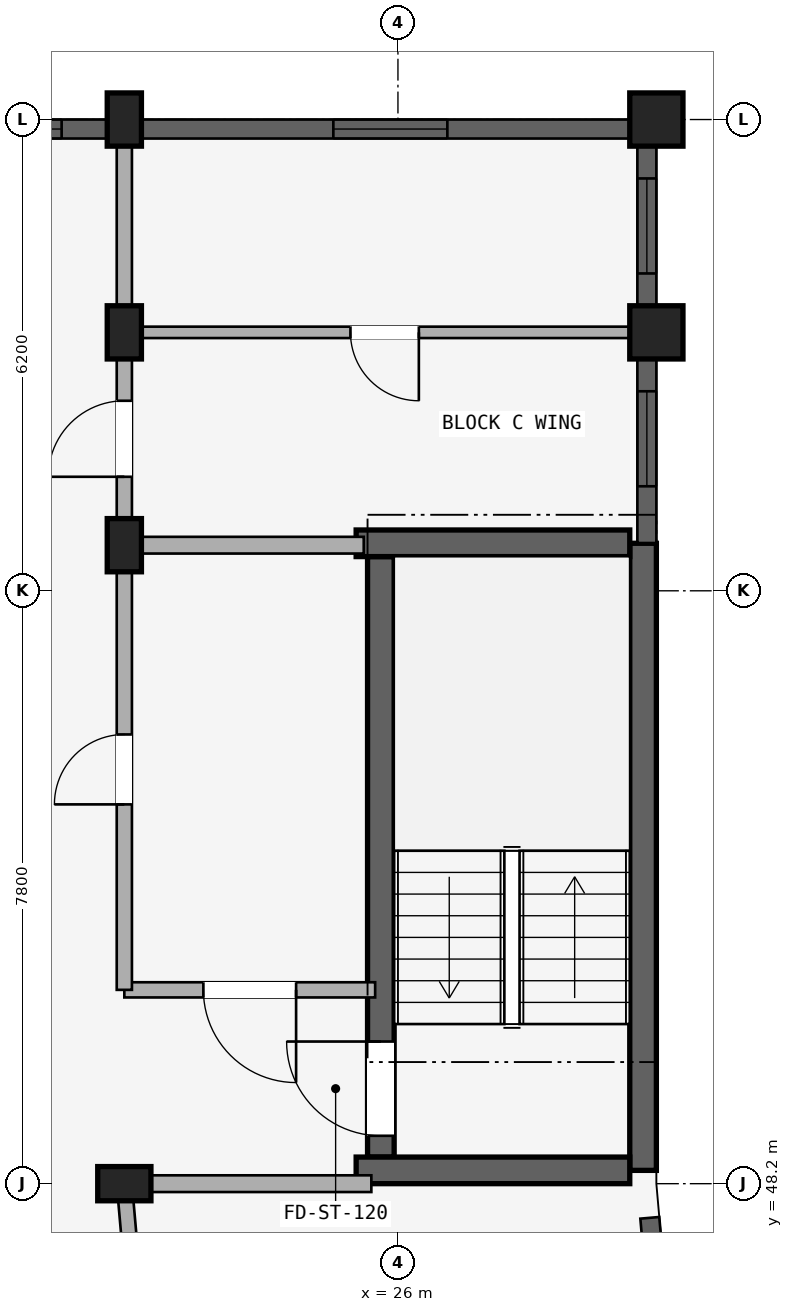
"""IFC4 building model, lengths in metres.
Left out: names, types, materials, properties, quantities, classifications, styles, units other than length and angle.
Written with IfcOpenShell. Run it as: python <this file> out.ifc"""

import sys

from ifc_helpers import new_model, si_unit, direction, frame, frame_2d, origin, origin_2d, place, context, subcontext, project, spatial, rectangle, extrude, element, fill, save


model = new_model("IFC4")
c1 = context("Model", 3, precision=1e-05, world=origin(), true_north=direction((0.0, 1.0)))
c2 = subcontext(c1, "Body", "Model", "MODEL_VIEW")
j1 = project(units=[si_unit("LENGTHUNIT", "METRE"), si_unit("PLANEANGLEUNIT", "RADIAN")], contexts=[c1])
p1 = place(None, origin())
s1 = spatial("IfcSite", under=j1, at=p1, CompositionType="ELEMENT")
p2 = place(p1, origin())
s2 = spatial("IfcBuilding", under=s1, at=p2, CompositionType="ELEMENT")
p3 = place(p2, frame((0.0, 0.0, 24.45)))
s3 = spatial("IfcBuildingStorey", under=s2, at=p3, CompositionType="ELEMENT", Elevation=24.45)
p4 = place(p3, frame((29.225, 48.375, 0.0), z_axis=(0.0, 0.0, 1.0), x_axis=(0.0, 1.0, 0.0)))
e1 = element("IfcWall", 1, at=p4, inside=s3, PredefinedType="SHEAR", context=c2, shape_type="SweptSolid", body=[
    extrude(rectangle(XDim=8.25, YDim=0.35, at=frame_2d((4.125, 0.0))), origin(), (0.0, 0.0, 1.0), 2.93),
])
p5 = place(p3, frame((25.775, 48.55, 0.0), z_axis=(0.0, 0.0, 1.0), x_axis=(0.0, 1.0, 0.0)))
e2 = element("IfcWall", 2, at=p5, inside=s3, PredefinedType="SHEAR", context=c2, shape_type="SweptSolid", body=[
    extrude(rectangle(XDim=7.9, YDim=0.35, at=frame_2d((3.95, 0.0))), origin(), (0.0, 0.0, 1.0), 2.93),
])
p6 = place(p5, frame((0.28, 0.0, 0.0)))
e3 = element("IfcOpeningElement", 3, at=p6, cuts=e2, PredefinedType="OPENING", context=c2, shape_type="SweptSolid", body=[
    extrude(rectangle(XDim=1.24, YDim=2.15, at=frame_2d((0.62, 1.075))), frame((0.0, 0.185, 0.0), z_axis=(0.0, -1.0, 0.0), x_axis=(1.0, 0.0, 0.0)), (0.0, 0.0, 1.0), 0.37),
])
for number, where, z_axis, x_axis in (
    (4, (29.05, 48.375, 0.0), (0.0, 0.0, 1.0), (-1.0, 0.0, 0.0)),
    (5, (29.05, 56.625, 0.0), (0.0, 0.0, 1.0), (-1.0, 0.0, 0.0)),
):
    element("IfcWall", number, at=place(p3, frame(where, z_axis=z_axis, x_axis=x_axis)), inside=s3, PredefinedType="SHEAR", context=c2, shape_type="SweptSolid", body=[
        extrude(rectangle(XDim=3.6, YDim=0.35, at=frame_2d((1.8, 0.0))), origin(), (0.0, 0.0, 1.0), 2.93),
    ])
for number, where, z_axis, x_axis in (
    (6, (22.4, 48.2, 0.0), (0.0, 0.0, 1.0), (0.0, 1.0, 0.0)),
    (7, (22.4, 56.6, 0.0), (0.0, 0.0, 1.0), (1.0, 0.0, 0.0)),
):
    element("IfcColumn", number, at=place(p3, frame(where, z_axis=z_axis, x_axis=x_axis)), inside=s3, PredefinedType="COLUMN", context=c2, shape_type="SweptSolid", body=[
        extrude(rectangle(XDim=0.45, YDim=0.7, at=origin_2d()), origin(), (0.0, 0.0, 1.0), 2.93),
    ])
p7 = place(p3, frame((29.4, 59.4, 0.0), z_axis=(0.0, 0.0, 1.0), x_axis=(1.0, 0.0, 0.0)))
e8 = element("IfcColumn", 8, at=p7, inside=s3, PredefinedType="COLUMN", context=c2, shape_type="SweptSolid", body=[
    extrude(rectangle(XDim=0.7, YDim=0.7, at=origin_2d()), origin(), (0.0, 0.0, 1.0), 2.93),
])
p8 = place(p3, frame((22.4, 59.4, 0.0), z_axis=(0.0, 0.0, 1.0), x_axis=(1.0, 0.0, 0.0)))
e9 = element("IfcColumn", 9, at=p8, inside=s3, PredefinedType="COLUMN", context=c2, shape_type="SweptSolid", body=[
    extrude(rectangle(XDim=0.45, YDim=0.7, at=origin_2d()), origin(), (0.0, 0.0, 1.0), 2.93),
])
p9 = place(p3, frame((29.4, 62.2, 0.0), z_axis=(0.0, 0.0, 1.0), x_axis=(1.0, 0.0, 0.0)))
e10 = element("IfcColumn", 10, at=p9, inside=s3, PredefinedType="COLUMN", context=c2, shape_type="SweptSolid", body=[
    extrude(rectangle(XDim=0.7, YDim=0.7, at=origin_2d()), origin(), (0.0, 0.0, 1.0), 2.93),
])
p10 = place(p3, frame((22.4, 62.2, 0.0), z_axis=(0.0, 0.0, 1.0), x_axis=(1.0, 0.0, 0.0)))
e11 = element("IfcColumn", 11, at=p10, inside=s3, PredefinedType="COLUMN", context=c2, shape_type="SweptSolid", body=[
    extrude(rectangle(XDim=0.45, YDim=0.7, at=origin_2d()), origin(), (0.0, 0.0, 1.0), 2.93),
])
p11 = place(p3, frame((25.7, 50.75, 0.0), z_axis=(0.0, 0.0, 1.0), x_axis=(-1.0, 0.0, 0.0)))
e12 = element("IfcWall", 12, at=p11, inside=s3, PredefinedType="STANDARD", context=c2, shape_type="SweptSolid", body=[
    extrude(rectangle(XDim=3.3, YDim=0.2, at=frame_2d((1.65, 0.0))), origin(), (0.0, 0.0, 1.0), 2.372),
])
p12 = place(p11, frame((1.04, 0.0, 0.0)))
e13 = element("IfcOpeningElement", 13, at=p12, cuts=e12, PredefinedType="OPENING", context=c2, shape_type="SweptSolid", body=[
    extrude(rectangle(XDim=1.22, YDim=2.15, at=frame_2d((0.61, 1.075))), frame((0.0, 0.11, 0.0), z_axis=(0.0, -1.0, 0.0), x_axis=(1.0, 0.0, 0.0)), (0.0, 0.0, 1.0), 0.22),
])
p13 = place(p3, frame((22.4, 50.75, 0.0), z_axis=(0.0, 0.0, 1.0), x_axis=(0.0, 1.0, 0.0)))
e14 = element("IfcWall", 14, at=p13, inside=s3, PredefinedType="STANDARD", context=c2, shape_type="SweptSolid", body=[
    extrude(rectangle(XDim=5.8, YDim=0.2, at=frame_2d((2.9, 0.0))), origin(), (0.0, 0.0, 1.0), 2.372),
])
p14 = place(p13, frame((2.44, 0.0, 0.0)))
e15 = element("IfcOpeningElement", 15, at=p14, cuts=e14, PredefinedType="OPENING", context=c2, shape_type="SweptSolid", body=[
    extrude(rectangle(XDim=0.92, YDim=2.1, at=frame_2d((0.46, 1.05))), frame((0.0, 0.11, 0.0), z_axis=(0.0, -1.0, 0.0), x_axis=(1.0, 0.0, 0.0)), (0.0, 0.0, 1.0), 0.22),
])
p15 = place(p3, frame((22.792, 43.72, 0.0), z_axis=(0.0, 0.0, 1.0), x_axis=(-0.087187153726, 0.996191949488, 0.0)))
e16 = element("IfcWall", 16, at=p15, inside=s3, PredefinedType="STANDARD", context=c2, shape_type="SweptSolid", body=[
    extrude(rectangle(XDim=4.497, YDim=0.2, at=frame_2d((2.249, 0.0))), origin(), (0.0, 0.0, 1.0), 2.372),
])
p16 = place(p3, frame((25.65, 48.2, 0.0), z_axis=(0.0, 0.0, 1.0), x_axis=(-1.0, 0.0, 0.0)))
e17 = element("IfcWall", 17, at=p16, inside=s3, PredefinedType="STANDARD", context=c2, shape_type="SweptSolid", body=[
    extrude(rectangle(XDim=3.2, YDim=0.22, at=frame_2d((1.6, 0.0))), origin(), (0.0, 0.0, 1.0), 2.372),
])
p17 = place(p3, frame((22.4, 56.6, 0.0), z_axis=(0.0, 0.0, 1.0), x_axis=(0.0, 1.0, 0.0)))
e18 = element("IfcWall", 18, at=p17, inside=s3, PredefinedType="STANDARD", context=c2, shape_type="SweptSolid", body=[
    extrude(rectangle(XDim=2.8, YDim=0.2, at=frame_2d((1.4, 0.0))), origin(), (0.0, 0.0, 1.0), 2.372),
])
p18 = place(p17, frame((0.9, 0.0, 0.0)))
e19 = element("IfcOpeningElement", 19, at=p18, cuts=e18, PredefinedType="OPENING", context=c2, shape_type="SweptSolid", body=[
    extrude(rectangle(XDim=1.0, YDim=2.15, at=frame_2d((0.5, 1.075))), frame((0.0, 0.11, 0.0), z_axis=(0.0, -1.0, 0.0), x_axis=(1.0, 0.0, 0.0)), (0.0, 0.0, 1.0), 0.22),
])
p19 = place(p3, frame((25.55, 56.6, 0.0), z_axis=(0.0, 0.0, 1.0), x_axis=(-1.0, 0.0, 0.0)))
e20 = element("IfcWall", 20, at=p19, inside=s3, PredefinedType="STANDARD", context=c2, shape_type="SweptSolid", body=[
    extrude(rectangle(XDim=3.1, YDim=0.22, at=frame_2d((1.55, 0.0))), origin(), (0.0, 0.0, 1.0), 2.372),
])
p20 = place(p3, frame((22.4, 59.4, 0.0), z_axis=(0.0, 0.0, 1.0), x_axis=(0.0, 1.0, 0.0)))
e21 = element("IfcWall", 21, at=p20, inside=s3, PredefinedType="STANDARD", context=c2, shape_type="SweptSolid", body=[
    extrude(rectangle(XDim=2.8, YDim=0.2, at=frame_2d((1.4, 0.0))), origin(), (0.0, 0.0, 1.0), 2.372),
])
p21 = place(p3, frame((29.2, 59.4, 0.0), z_axis=(0.0, 0.0, 1.0), x_axis=(-1.0, 0.0, 0.0)))
e22 = element("IfcWall", 22, at=p21, inside=s3, PredefinedType="PARTITIONING", context=c2, shape_type="SweptSolid", body=[
    extrude(rectangle(XDim=6.75, YDim=0.15, at=frame_2d((3.375, 0.0))), origin(), (0.0, 0.0, 1.0), 2.372),
])
p22 = place(p21, frame((2.925, 0.0, 0.0)))
e23 = element("IfcOpeningElement", 23, at=p22, cuts=e22, PredefinedType="OPENING", context=c2, shape_type="SweptSolid", body=[
    extrude(rectangle(XDim=0.9, YDim=2.1, at=frame_2d((0.45, 1.05))), frame((0.0, 0.085, 0.0), z_axis=(0.0, -1.0, 0.0), x_axis=(1.0, 0.0, 0.0)), (0.0, 0.0, 1.0), 0.17),
])
p23 = place(p3, frame((29.539, 45.177, 0.0), z_axis=(0.0, 0.0, 1.0), x_axis=(-0.087229084652, 0.996188278786, 0.0)))
e24 = element("IfcWall", 24, at=p23, inside=s3, PredefinedType="STANDARD", context=c2, shape_type="SweptSolid", body=[
    extrude(rectangle(XDim=2.583, YDim=0.25, at=frame_2d((1.292, 0.0))), origin(), (0.0, 0.0, 1.0), 2.422),
])
p24 = place(p23, frame((0.61, 0.0, 0.622)))
e25 = element("IfcOpeningElement", 25, at=p24, cuts=e24, PredefinedType="OPENING", context=c2, shape_type="SweptSolid", body=[
    extrude(rectangle(XDim=1.55, YDim=1.6, at=frame_2d((0.775, 0.8))), frame((0.0, 0.135, 0.0), z_axis=(0.0, -1.0, 0.0), x_axis=(1.0, 0.0, 0.0)), (0.0, 0.0, 1.0), 0.27),
])
p25 = place(p3, frame((29.275, 56.628, 0.0), z_axis=(0.0, 0.0, 1.0), x_axis=(0.0, 1.0, 0.0)))
e26 = element("IfcWall", 26, at=p25, inside=s3, PredefinedType="STANDARD", context=c2, shape_type="SweptSolid", body=[
    extrude(rectangle(XDim=2.418, YDim=0.25, at=frame_2d((1.209, 0.0))), origin(), (0.0, 0.0, 1.0), 2.472),
])
p26 = place(p25, frame((0.747, 0.0, 0.722)))
e27 = element("IfcOpeningElement", 27, at=p26, cuts=e26, PredefinedType="OPENING", context=c2, shape_type="SweptSolid", body=[
    extrude(rectangle(XDim=1.25, YDim=1.55, at=frame_2d((0.625, 0.775))), frame((0.0, 0.135, 0.0), z_axis=(0.0, -1.0, 0.0), x_axis=(1.0, 0.0, 0.0)), (0.0, 0.0, 1.0), 0.27),
])
p27 = place(p3, frame((29.275, 59.753, 0.0), z_axis=(0.0, 0.0, 1.0), x_axis=(0.0, 1.0, 0.0)))
e28 = element("IfcWall", 28, at=p27, inside=s3, PredefinedType="STANDARD", context=c2, shape_type="SweptSolid", body=[
    extrude(rectangle(XDim=2.093, YDim=0.25, at=frame_2d((1.046, 0.0))), origin(), (0.0, 0.0, 1.0), 2.472),
])
p28 = place(p27, frame((0.421, 0.0, 0.722)))
e29 = element("IfcOpeningElement", 29, at=p28, cuts=e28, PredefinedType="OPENING", context=c2, shape_type="SweptSolid", body=[
    extrude(rectangle(XDim=1.25, YDim=1.55, at=frame_2d((0.625, 0.775))), frame((0.0, 0.135, 0.0), z_axis=(0.0, -1.0, 0.0), x_axis=(1.0, 0.0, 0.0)), (0.0, 0.0, 1.0), 0.27),
])
p29 = place(p3, frame((29.046, 62.075, 0.0), z_axis=(0.0, 0.0, 1.0), x_axis=(-1.0, 0.0, 0.0)))
e30 = element("IfcWall", 30, at=p29, inside=s3, PredefinedType="STANDARD", context=c2, shape_type="SweptSolid", body=[
    extrude(rectangle(XDim=6.418, YDim=0.25, at=frame_2d((3.209, 0.0))), origin(), (0.0, 0.0, 1.0), 2.372),
])
p30 = place(p29, frame((2.396, 0.0, 0.522)))
e31 = element("IfcOpeningElement", 31, at=p30, cuts=e30, PredefinedType="OPENING", context=c2, shape_type="SweptSolid", body=[
    extrude(rectangle(XDim=1.5, YDim=1.65, at=frame_2d((0.75, 0.825))), frame((0.0, 0.135, 0.0), z_axis=(0.0, -1.0, 0.0), x_axis=(1.0, 0.0, 0.0)), (0.0, 0.0, 1.0), 0.27),
])
p31 = place(p3, frame((22.171, 62.075, 0.0), z_axis=(0.0, 0.0, 1.0), x_axis=(-1.0, 0.0, 0.0)))
e32 = element("IfcWall", 32, at=p31, inside=s3, PredefinedType="STANDARD", context=c2, shape_type="SweptSolid", body=[
    extrude(rectangle(XDim=1.943, YDim=0.25, at=frame_2d((0.971, 0.0))), origin(), (0.0, 0.0, 1.0), 2.372),
])
p32 = place(p31, frame((0.596, 0.0, 0.88)))
e33 = element("IfcOpeningElement", 33, at=p32, cuts=e32, PredefinedType="OPENING", context=c2, shape_type="SweptSolid", body=[
    extrude(rectangle(XDim=0.75, YDim=1.05, at=frame_2d((0.375, 0.525))), frame((0.0, 0.135, 0.0), z_axis=(0.0, -1.0, 0.0), x_axis=(1.0, 0.0, 0.0)), (0.0, 0.0, 1.0), 0.27),
])
p33 = place(p26, origin())
e34 = element("IfcWindow", 34, at=p33, inside=s3, PartitioningType="SINGLE_PANEL", PredefinedType="WINDOW", context=c2, shape_type="SweptSolid", body=[
    extrude(rectangle(XDim=1.25, YDim=1.55, at=frame_2d((0.625, 0.775))), frame((0.0, 0.03, 0.0), z_axis=(0.0, -1.0, 0.0), x_axis=(1.0, 0.0, 0.0)), (0.0, 0.0, 1.0), 0.06),
])
fill(e27, e34)
p34 = place(p28, origin())
e35 = element("IfcWindow", 35, at=p34, inside=s3, PartitioningType="SINGLE_PANEL", PredefinedType="WINDOW", context=c2, shape_type="SweptSolid", body=[
    extrude(rectangle(XDim=1.25, YDim=1.55, at=frame_2d((0.625, 0.775))), frame((0.0, 0.03, 0.0), z_axis=(0.0, -1.0, 0.0), x_axis=(1.0, 0.0, 0.0)), (0.0, 0.0, 1.0), 0.06),
])
fill(e29, e35)
p35 = place(p30, origin())
e36 = element("IfcWindow", 36, at=p35, inside=s3, PartitioningType="DOUBLE_PANEL_VERTICAL", PredefinedType="WINDOW", context=c2, shape_type="SweptSolid", body=[
    extrude(rectangle(XDim=1.5, YDim=1.65, at=frame_2d((0.75, 0.825))), frame((0.0, 0.03, 0.0), z_axis=(0.0, -1.0, 0.0), x_axis=(1.0, 0.0, 0.0)), (0.0, 0.0, 1.0), 0.06),
])
fill(e31, e36)
p36 = place(p32, origin())
e37 = element("IfcWindow", 37, at=p36, inside=s3, PartitioningType="SINGLE_PANEL", PredefinedType="WINDOW", context=c2, shape_type="SweptSolid", body=[
    extrude(rectangle(XDim=0.75, YDim=1.05, at=frame_2d((0.375, 0.525))), frame((0.0, 0.03, 0.0), z_axis=(0.0, -1.0, 0.0), x_axis=(1.0, 0.0, 0.0)), (0.0, 0.0, 1.0), 0.06),
])
fill(e33, e37)
p37 = place(p6, frame((1.24, 0.0, 0.0), z_axis=(0.0, 0.0, 1.0), x_axis=(-1.0, 0.0, 0.0)))
e38 = element("IfcDoor", 38, at=p37, inside=s3, OperationType="SINGLE_SWING_LEFT", PredefinedType="DOOR", context=c2, shape_type="SweptSolid", body=[
    extrude(rectangle(XDim=1.24, YDim=2.15, at=frame_2d((0.62, 1.075))), frame((0.0, 0.025, 0.0), z_axis=(0.0, -1.0, 0.0), x_axis=(1.0, 0.0, 0.0)), (0.0, 0.0, 1.0), 0.05),
])
fill(e3, e38)
p38 = place(p12, origin())
e39 = element("IfcDoor", 39, at=p38, inside=s3, OperationType="SINGLE_SWING_LEFT", PredefinedType="DOOR", context=c2, shape_type="SweptSolid", body=[
    extrude(rectangle(XDim=1.22, YDim=2.15, at=frame_2d((0.61, 1.075))), frame((0.0, 0.025, 0.0), z_axis=(0.0, -1.0, 0.0), x_axis=(1.0, 0.0, 0.0)), (0.0, 0.0, 1.0), 0.05),
])
fill(e13, e39)
p39 = place(p14, frame((0.92, 0.0, 0.0), z_axis=(0.0, 0.0, 1.0), x_axis=(-1.0, 0.0, 0.0)))
e40 = element("IfcDoor", 40, at=p39, inside=s3, OperationType="SINGLE_SWING_RIGHT", PredefinedType="DOOR", context=c2, shape_type="SweptSolid", body=[
    extrude(rectangle(XDim=0.92, YDim=2.1, at=frame_2d((0.46, 1.05))), frame((0.0, 0.025, 0.0), z_axis=(0.0, -1.0, 0.0), x_axis=(1.0, 0.0, 0.0)), (0.0, 0.0, 1.0), 0.05),
])
fill(e15, e40)
p40 = place(p18, origin())
e41 = element("IfcDoor", 41, at=p40, inside=s3, OperationType="SINGLE_SWING_LEFT", PredefinedType="DOOR", context=c2, shape_type="SweptSolid", body=[
    extrude(rectangle(XDim=1.0, YDim=2.15, at=frame_2d((0.5, 1.075))), frame((0.0, 0.025, 0.0), z_axis=(0.0, -1.0, 0.0), x_axis=(1.0, 0.0, 0.0)), (0.0, 0.0, 1.0), 0.05),
])
fill(e19, e41)
p41 = place(p22, origin())
e42 = element("IfcDoor", 42, at=p41, inside=s3, OperationType="SINGLE_SWING_LEFT", PredefinedType="DOOR", context=c2, shape_type="SweptSolid", body=[
    extrude(rectangle(XDim=0.9, YDim=2.1, at=frame_2d((0.45, 1.05))), frame((0.0, 0.025, 0.0), z_axis=(0.0, -1.0, 0.0), x_axis=(1.0, 0.0, 0.0)), (0.0, 0.0, 1.0), 0.05),
])
fill(e23, e42)
save(model, sys.argv[1])
